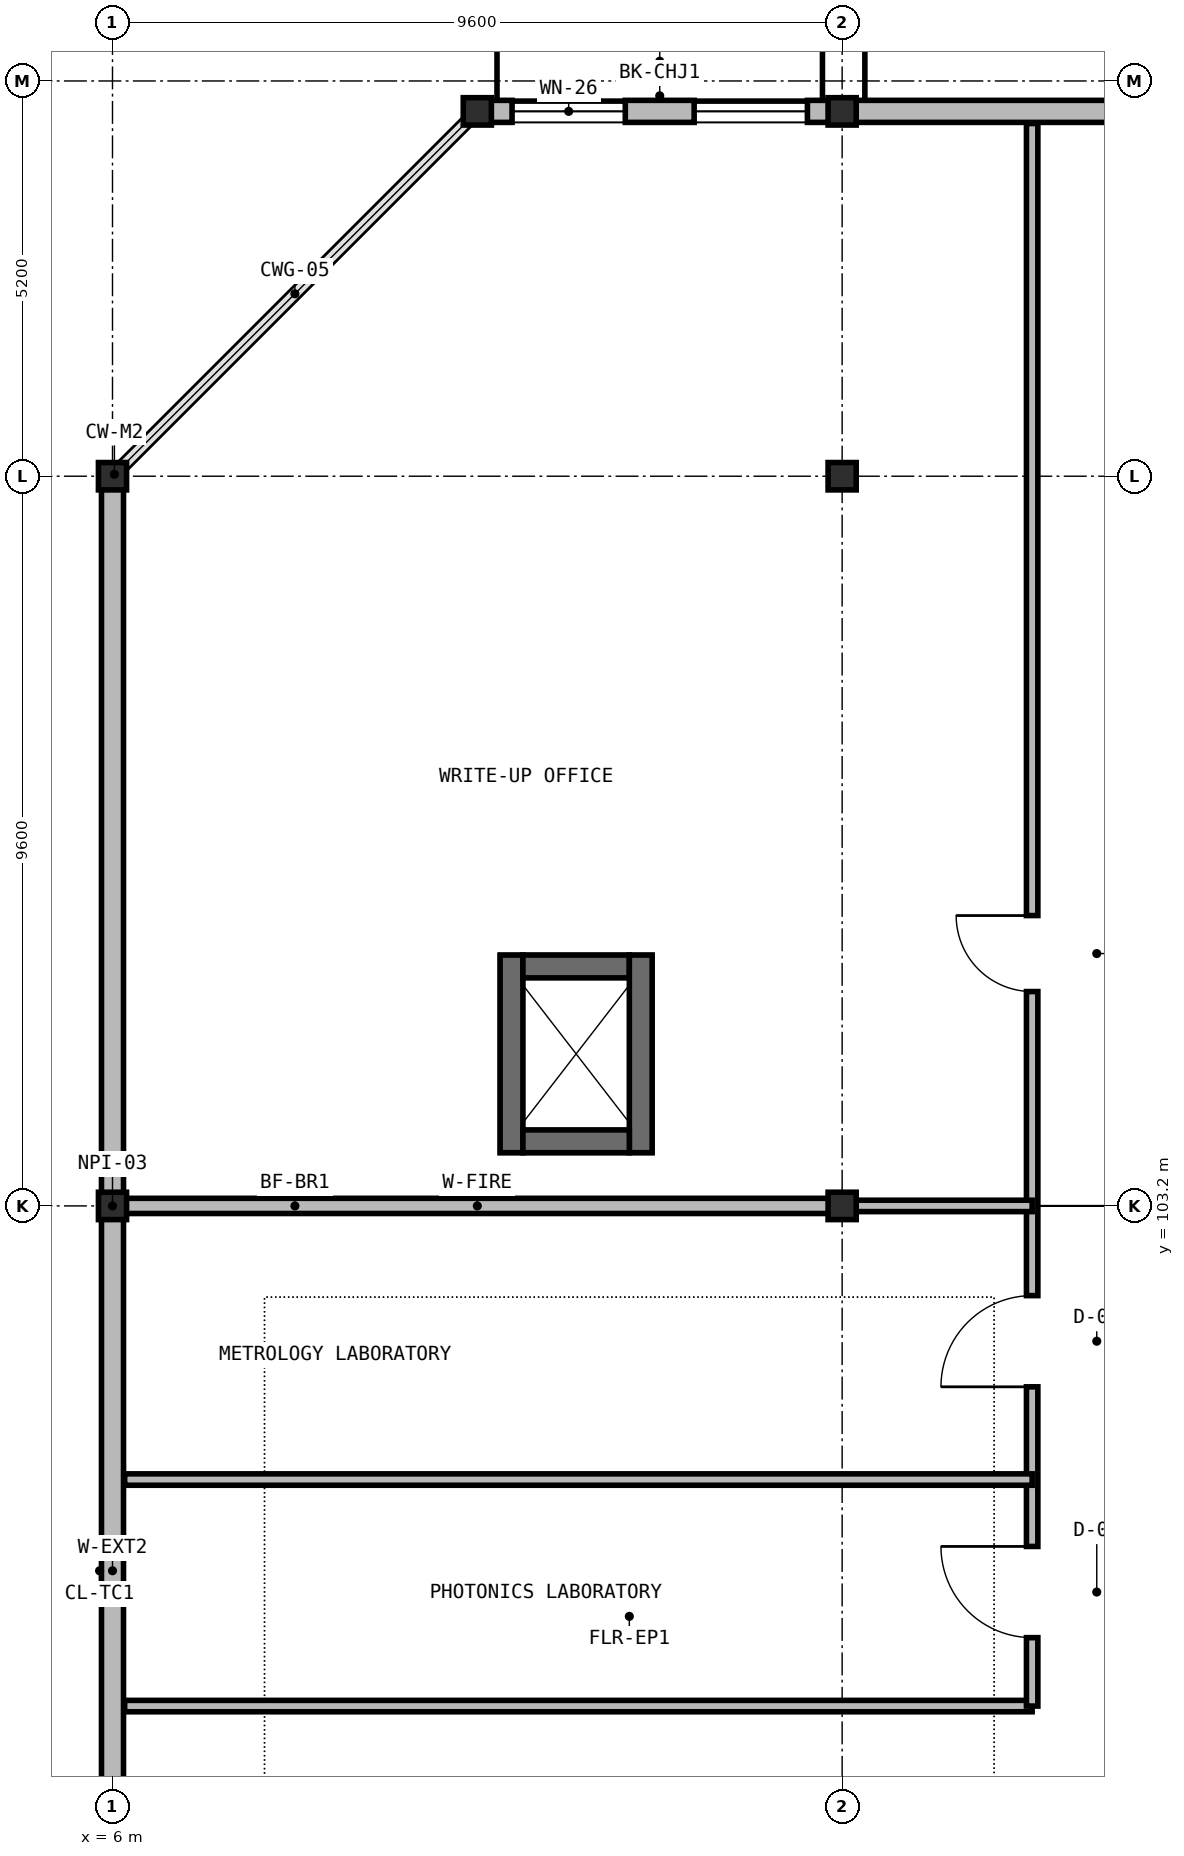
"""IFC4 building model, lengths in metres.
Left out: names, types, materials, properties, quantities, classifications, styles, units other than length and angle.
Written with IfcOpenShell. Run it as: python <this file> out.ifc"""

import sys

from ifc_helpers import new_model, si_unit, direction, frame, frame_2d, origin, origin_2d, place, context, subcontext, project, spatial, rectangle, i_section, extrude, element, fill, save


model = new_model("IFC4")
c1 = context("Model", 3, precision=1e-05, world=origin(), true_north=direction((0.0, 1.0)))
c2 = subcontext(c1, "Body", "Model", "MODEL_VIEW")
j1 = project(units=[si_unit("LENGTHUNIT", "METRE"), si_unit("PLANEANGLEUNIT", "RADIAN")], contexts=[c1])
p1 = place(None, origin())
s1 = spatial("IfcSite", under=j1, at=p1, CompositionType="ELEMENT")
p2 = place(p1, origin())
s2 = spatial("IfcBuilding", under=s1, at=p2, CompositionType="ELEMENT")
p3 = place(p2, frame((0.0, 0.0, 9.8)))
s3 = spatial("IfcBuildingStorey", under=s2, at=p3, CompositionType="ELEMENT", Elevation=9.8)
for number, where, z_axis, x_axis in (
    (1, (6.0, 103.2, 0.0), (0.0, 0.0, 1.0), (1.0, 0.0, 0.0)),
    (2, (6.0, 112.8, 0.0), (0.0, 0.0, 1.0), (1.0, 0.0, 0.0)),
    (3, (15.6, 103.2, 0.0), (0.0, 0.0, 1.0), (1.0, 0.0, 0.0)),
    (4, (15.6, 112.8, 0.0), (0.0, 0.0, 1.0), (1.0, 0.0, 0.0)),
    (5, (15.6, 117.6, 0.0), (0.0, 0.0, 1.0), (1.0, 0.0, 0.0)),
    (6, (10.8, 117.6, 0.0), (0.0, 0.0, 1.0), (1.0, 0.0, 0.0)),
):
    element("IfcColumn", number, at=place(p3, frame(where, z_axis=z_axis, x_axis=x_axis)), inside=s3, PredefinedType="COLUMN", context=c2, shape_type="SweptSolid", body=[
        extrude(i_section(OverallWidth=0.37, OverallDepth=0.36, WebThickness=0.014, FlangeThickness=0.022, at=origin_2d()), origin(), (0.0, 0.0, 1.0), 4.55),
    ])
p4 = place(p3, frame((11.25, 103.9, 0.0), z_axis=(0.0, 0.0, 1.0), x_axis=(0.0, 1.0, 0.0)))
e7 = element("IfcWall", 7, at=p4, inside=s3, PredefinedType="SHEAR", context=c2, shape_type="SweptSolid", body=[
    extrude(rectangle(XDim=2.6, YDim=0.3, at=frame_2d((1.3, 0.0))), origin(), (0.0, 0.0, 1.0), 4.37),
])
p5 = place(p3, frame((11.4, 106.35, 0.0), z_axis=(0.0, 0.0, 1.0), x_axis=(1.0, 0.0, 0.0)))
e8 = element("IfcWall", 8, at=p5, inside=s3, PredefinedType="SHEAR", context=c2, shape_type="SweptSolid", body=[
    extrude(rectangle(XDim=1.4, YDim=0.3, at=frame_2d((0.7, 0.0))), origin(), (0.0, 0.0, 1.0), 4.37),
])
p6 = place(p3, frame((12.95, 106.5, 0.0), z_axis=(0.0, 0.0, 1.0), x_axis=(0.0, -1.0, 0.0)))
e9 = element("IfcWall", 9, at=p6, inside=s3, PredefinedType="SHEAR", context=c2, shape_type="SweptSolid", body=[
    extrude(rectangle(XDim=2.6, YDim=0.3, at=frame_2d((1.3, 0.0))), origin(), (0.0, 0.0, 1.0), 4.37),
])
p7 = place(p3, frame((12.8, 104.05, 0.0), z_axis=(0.0, 0.0, 1.0), x_axis=(-1.0, 0.0, 0.0)))
e10 = element("IfcWall", 10, at=p7, inside=s3, PredefinedType="SHEAR", context=c2, shape_type="SweptSolid", body=[
    extrude(rectangle(XDim=1.4, YDim=0.3, at=frame_2d((0.7, 0.0))), origin(), (0.0, 0.0, 1.0), 4.37),
])
p8 = place(p3, frame((6.0, 93.604, 0.0), z_axis=(0.0, 0.0, 1.0), x_axis=(0.0, 1.0, 0.0)))
e11 = element("IfcWall", 11, at=p8, inside=s3, PredefinedType="SOLIDWALL", context=c2, shape_type="SweptSolid", body=[
    extrude(rectangle(XDim=9.592, YDim=0.29, at=frame_2d((4.796, 0.0))), origin(), (0.0, 0.0, 1.0), 3.884),
])
p9 = place(p3, frame((6.0, 103.204, 0.0), z_axis=(0.0, 0.0, 1.0), x_axis=(0.0, 1.0, 0.0)))
e12 = element("IfcWall", 12, at=p9, inside=s3, PredefinedType="SOLIDWALL", context=c2, shape_type="SweptSolid", body=[
    extrude(rectangle(XDim=9.592, YDim=0.29, at=frame_2d((4.796, 0.0))), origin(), (0.0, 0.0, 1.0), 3.884),
])
p10 = place(p3, frame((10.804, 117.6, 0.0), z_axis=(0.0, 0.0, 1.0), x_axis=(1.0, 0.0, 0.0)))
e13 = element("IfcWall", 13, at=p10, inside=s3, PredefinedType="SOLIDWALL", context=c2, shape_type="SweptSolid", body=[
    extrude(rectangle(XDim=4.792, YDim=0.29, at=frame_2d((2.396, 0.0))), origin(), (0.0, 0.0, 1.0), 4.37),
])
p11 = place(p10, frame((0.453, 0.0, 0.95)))
e14 = element("IfcOpeningElement", 14, at=p11, cuts=e13, PredefinedType="OPENING", context=c2, shape_type="SweptSolid", body=[
    extrude(rectangle(XDim=1.49, YDim=1.75, at=frame_2d((0.745, 0.875))), frame((0.0, 0.155, 0.0), z_axis=(0.0, -1.0, 0.0), x_axis=(1.0, 0.0, 0.0)), (0.0, 0.0, 1.0), 0.31),
])
p12 = place(p10, frame((2.849, 0.0, 0.95)))
e15 = element("IfcOpeningElement", 15, at=p12, cuts=e13, PredefinedType="OPENING", context=c2, shape_type="SweptSolid", body=[
    extrude(rectangle(XDim=1.49, YDim=1.75, at=frame_2d((0.745, 0.875))), frame((0.0, 0.155, 0.0), z_axis=(0.0, -1.0, 0.0), x_axis=(1.0, 0.0, 0.0)), (0.0, 0.0, 1.0), 0.31),
])
p13 = place(p3, frame((15.604, 117.6, 0.0), z_axis=(0.0, 0.0, 1.0), x_axis=(1.0, 0.0, 0.0)))
e16 = element("IfcWall", 16, at=p13, inside=s3, PredefinedType="SOLIDWALL", context=c2, shape_type="SweptSolid", body=[
    extrude(rectangle(XDim=9.592, YDim=0.29, at=frame_2d((4.796, 0.0))), origin(), (0.0, 0.0, 1.0), 3.884),
])
p14 = place(p13, frame((6.119, 0.0, 0.95)))
e17 = element("IfcOpeningElement", 17, at=p14, cuts=e16, PredefinedType="OPENING", context=c2, shape_type="SweptSolid", body=[
    extrude(rectangle(XDim=2.15, YDim=1.59, at=frame_2d((1.075, 0.795))), frame((0.0, 0.155, 0.0), z_axis=(0.0, -1.0, 0.0), x_axis=(1.0, 0.0, 0.0)), (0.0, 0.0, 1.0), 0.31),
])
p15 = place(p3, frame((6.16, 103.2, 0.0), z_axis=(0.0, 0.0, 1.0), x_axis=(1.0, 0.0, 0.0)))
e18 = element("IfcWall", 18, at=p15, inside=s3, PredefinedType="SOLIDWALL", context=c2, shape_type="SweptSolid", body=[
    extrude(rectangle(XDim=9.28, YDim=0.2, at=frame_2d((4.64, 0.0))), origin(), (0.0, 0.0, 1.0), 3.815),
])
p16 = place(p3, frame((6.16, 96.62, 0.0), z_axis=(0.0, 0.0, 1.0), x_axis=(1.0, 0.0, 0.0)))
e19 = element("IfcWall", 19, at=p16, inside=s3, PredefinedType="PARTITIONING", context=c2, shape_type="SweptSolid", body=[
    extrude(rectangle(XDim=11.94, YDim=0.15, at=frame_2d((5.97, 0.0))), origin(), (0.0, 0.0, 1.0), 4.3),
])
p17 = place(p3, frame((18.1, 96.62, 0.0), z_axis=(0.0, 0.0, 1.0), x_axis=(0.0, 1.0, 0.0)))
e20 = element("IfcWall", 20, at=p17, inside=s3, PredefinedType="PARTITIONING", context=c2, shape_type="SweptSolid", body=[
    extrude(rectangle(XDim=20.82, YDim=0.15, at=frame_2d((10.41, 0.0))), origin(), (0.0, 0.0, 1.0), 4.3),
])
p18 = place(p17, frame((0.9, 0.0, 0.0)))
e21 = element("IfcOpeningElement", 21, at=p18, cuts=e20, PredefinedType="OPENING", context=c2, shape_type="SweptSolid", body=[
    extrude(rectangle(XDim=1.2, YDim=2.2, at=frame_2d((0.6, 1.1))), frame((0.0, 0.085, 0.0), z_axis=(0.0, -1.0, 0.0), x_axis=(1.0, 0.0, 0.0)), (0.0, 0.0, 1.0), 0.17),
])
p19 = place(p17, frame((4.2, 0.0, 0.0)))
e22 = element("IfcOpeningElement", 22, at=p19, cuts=e20, PredefinedType="OPENING", context=c2, shape_type="SweptSolid", body=[
    extrude(rectangle(XDim=1.2, YDim=2.2, at=frame_2d((0.6, 1.1))), frame((0.0, 0.085, 0.0), z_axis=(0.0, -1.0, 0.0), x_axis=(1.0, 0.0, 0.0)), (0.0, 0.0, 1.0), 0.17),
])
p20 = place(p17, frame((9.4, 0.0, 0.0)))
e23 = element("IfcOpeningElement", 23, at=p20, cuts=e20, PredefinedType="OPENING", context=c2, shape_type="SweptSolid", body=[
    extrude(rectangle(XDim=1.0, YDim=2.2, at=frame_2d((0.5, 1.1))), frame((0.0, 0.085, 0.0), z_axis=(0.0, -1.0, 0.0), x_axis=(1.0, 0.0, 0.0)), (0.0, 0.0, 1.0), 0.17),
])
p21 = place(p3, frame((6.16, 99.6, 0.0), z_axis=(0.0, 0.0, 1.0), x_axis=(1.0, 0.0, 0.0)))
e24 = element("IfcWall", 24, at=p21, inside=s3, PredefinedType="PARTITIONING", context=c2, shape_type="SweptSolid", body=[
    extrude(rectangle(XDim=11.94, YDim=0.15, at=frame_2d((5.97, 0.0))), origin(), (0.0, 0.0, 1.0), 4.3),
])
p22 = place(p3, frame((15.55, 103.2, 0.0), z_axis=(0.0, 0.0, 1.0), x_axis=(1.0, 0.0, 0.0)))
e25 = element("IfcWall", 25, at=p22, inside=s3, PredefinedType="PARTITIONING", context=c2, shape_type="SweptSolid", body=[
    extrude(rectangle(XDim=2.55, YDim=0.15, at=frame_2d((1.275, 0.0))), origin(), (0.0, 0.0, 1.0), 3.815),
])
p23 = place(p11, origin())
e26 = element("IfcWindow", 26, at=p23, inside=s3, PartitioningType="SINGLE_PANEL", PredefinedType="WINDOW", context=c2, shape_type="SweptSolid", body=[
    extrude(rectangle(XDim=1.49, YDim=1.75, at=frame_2d((0.745, 0.875))), frame((0.0, 0.03, 0.0), z_axis=(0.0, -1.0, 0.0), x_axis=(1.0, 0.0, 0.0)), (0.0, 0.0, 1.0), 0.06),
])
fill(e14, e26)
p24 = place(p12, origin())
e27 = element("IfcWindow", 27, at=p24, inside=s3, PartitioningType="SINGLE_PANEL", PredefinedType="WINDOW", context=c2, shape_type="SweptSolid", body=[
    extrude(rectangle(XDim=1.49, YDim=1.75, at=frame_2d((0.745, 0.875))), frame((0.0, 0.03, 0.0), z_axis=(0.0, -1.0, 0.0), x_axis=(1.0, 0.0, 0.0)), (0.0, 0.0, 1.0), 0.06),
])
fill(e15, e27)
p25 = place(p18, origin())
e28 = element("IfcDoor", 28, at=p25, inside=s3, OperationType="SINGLE_SWING_RIGHT", PredefinedType="DOOR", context=c2, shape_type="SweptSolid", body=[
    extrude(rectangle(XDim=1.2, YDim=2.2, at=frame_2d((0.6, 1.1))), frame((0.0, 0.025, 0.0), z_axis=(0.0, -1.0, 0.0), x_axis=(1.0, 0.0, 0.0)), (0.0, 0.0, 1.0), 0.05),
])
fill(e21, e28)
p26 = place(p19, origin())
e29 = element("IfcDoor", 29, at=p26, inside=s3, OperationType="SINGLE_SWING_LEFT", PredefinedType="DOOR", context=c2, shape_type="SweptSolid", body=[
    extrude(rectangle(XDim=1.2, YDim=2.2, at=frame_2d((0.6, 1.1))), frame((0.0, 0.025, 0.0), z_axis=(0.0, -1.0, 0.0), x_axis=(1.0, 0.0, 0.0)), (0.0, 0.0, 1.0), 0.05),
])
fill(e22, e29)
p27 = place(p20, origin())
e30 = element("IfcDoor", 30, at=p27, inside=s3, OperationType="SINGLE_SWING_RIGHT", PredefinedType="DOOR", context=c2, shape_type="SweptSolid", body=[
    extrude(rectangle(XDim=1.0, YDim=2.2, at=frame_2d((0.5, 1.1))), frame((0.0, 0.025, 0.0), z_axis=(0.0, -1.0, 0.0), x_axis=(1.0, 0.0, 0.0)), (0.0, 0.0, 1.0), 0.05),
])
fill(e23, e30)
save(model, sys.argv[1])
